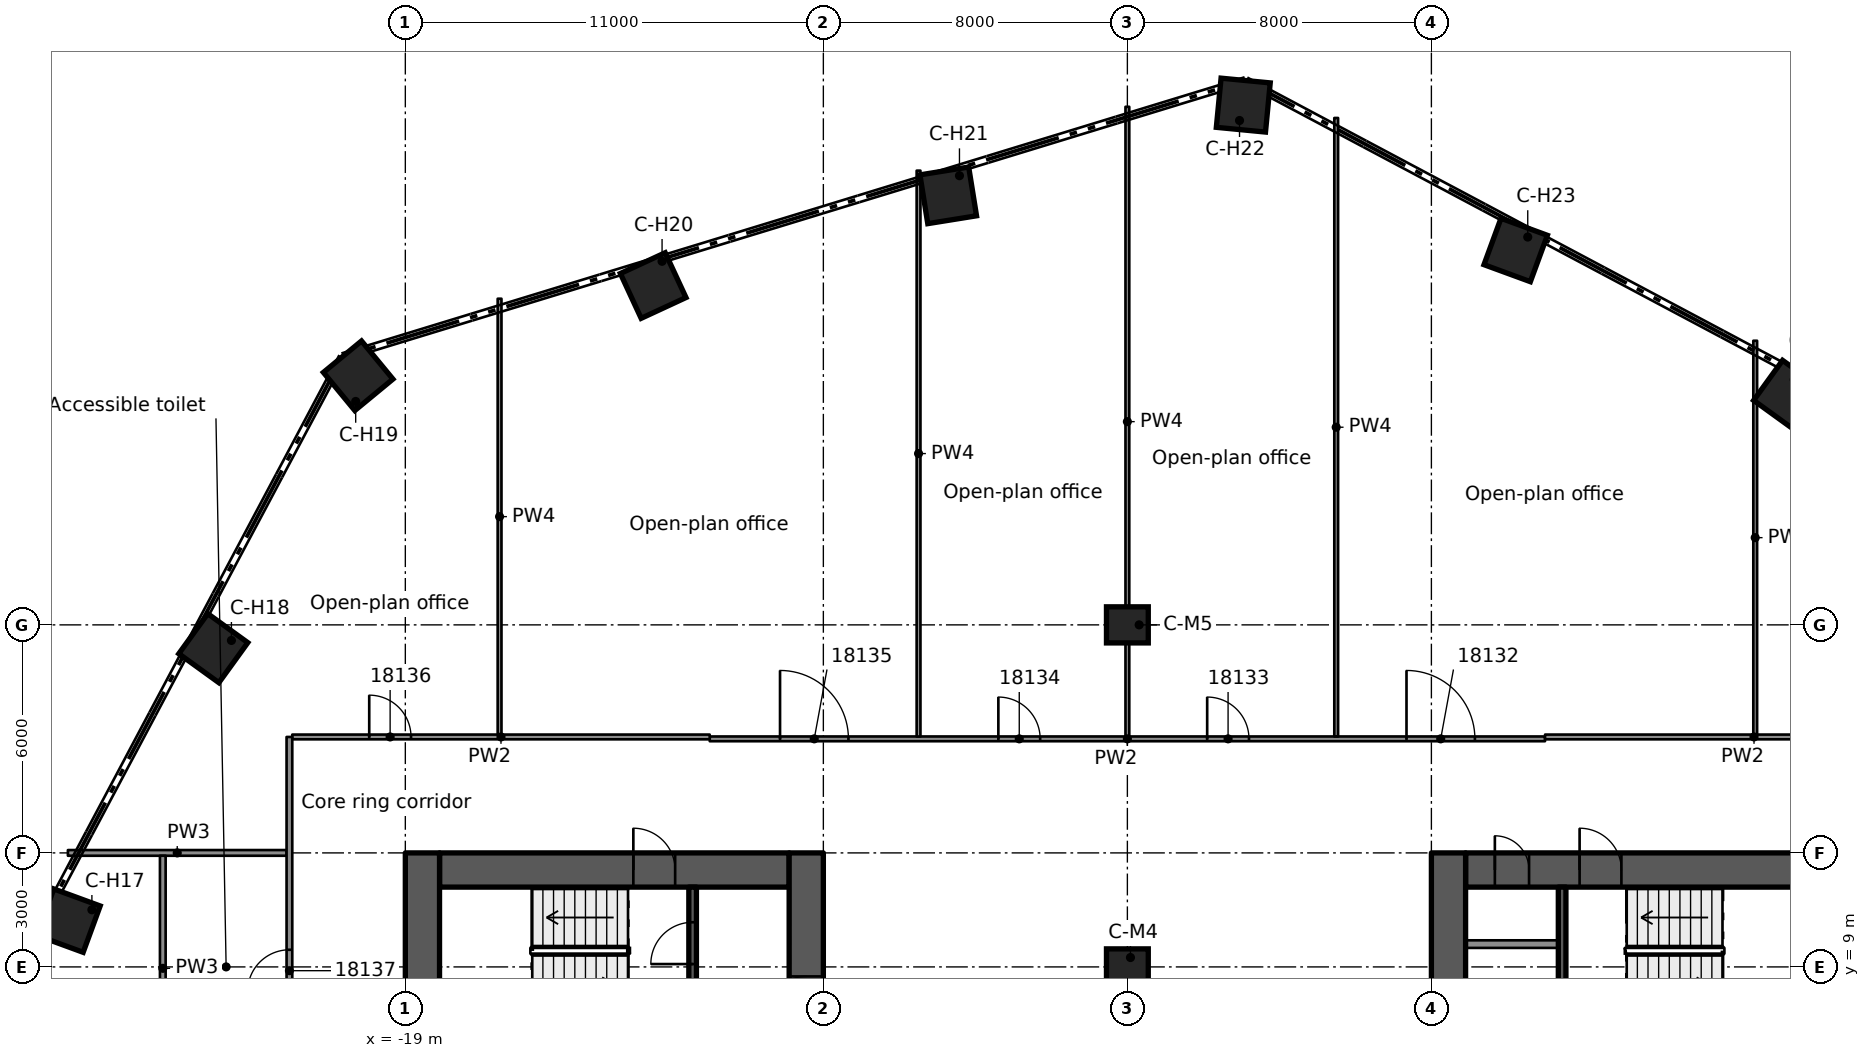
"""IFC4 building model, lengths in metres.
Left out: names, types, materials, properties, quantities, classifications, styles, units other than length and angle.
Written with IfcOpenShell. Run it as: python <this file> out.ifc"""

import sys

from ifc_helpers import new_model, si_unit, direction, frame, frame_2d, origin, origin_2d, place, context, subcontext, project, spatial, rectangle, extrude, element, fill, save


model = new_model("IFC4")
c1 = context("Model", 3, precision=1e-05, world=origin(), true_north=direction((0.0, 1.0)))
c2 = subcontext(c1, "Body", "Model", "MODEL_VIEW")
j1 = project(units=[si_unit("LENGTHUNIT", "METRE"), si_unit("PLANEANGLEUNIT", "RADIAN")], contexts=[c1])
p1 = place(None, origin())
s1 = spatial("IfcSite", under=j1, at=p1, CompositionType="ELEMENT")
p2 = place(p1, origin())
s2 = spatial("IfcBuilding", under=s1, at=p2, CompositionType="ELEMENT")
p3 = place(p2, frame((0.0, 0.0, 91.2)))
s3 = spatial("IfcBuildingStorey", under=s2, at=p3, CompositionType="ELEMENT", Elevation=91.2)
p4 = place(p3, frame((-18.1, 11.55, 0.0), z_axis=(0.0, 0.0, 1.0), x_axis=(1.0, 0.0, 0.0)))
e1 = element("IfcWall", 1, at=p4, inside=s3, PredefinedType="SHEAR", context=c2, shape_type="SweptSolid", body=[
    extrude(rectangle(XDim=9.2, YDim=0.9, at=frame_2d((4.6, 0.0))), origin(), (0.0, 0.0, 1.0), 3.5),
])
p5 = place(p4, frame((5.1, 0.0, 0.0)))
e2 = element("IfcOpeningElement", 2, at=p5, cuts=e1, PredefinedType="OPENING", context=c2, shape_type="SweptSolid", body=[
    extrude(rectangle(XDim=1.1, YDim=2.1, at=frame_2d((0.55, 1.05))), frame((0.0, 0.46, 0.0), z_axis=(0.0, -1.0, 0.0), x_axis=(1.0, 0.0, 0.0)), (0.0, 0.0, 1.0), 0.92),
])
p6 = place(p3, frame((-18.55, -12.0, 0.0), z_axis=(0.0, 0.0, 1.0), x_axis=(0.0, 1.0, 0.0)))
e3 = element("IfcWall", 3, at=p6, inside=s3, PredefinedType="SHEAR", context=c2, shape_type="SweptSolid", body=[
    extrude(rectangle(XDim=24.0, YDim=0.9, at=frame_2d((12.0, 0.0))), origin(), (0.0, 0.0, 1.0), 3.5),
])
p7 = place(p6, frame((10.1, 0.0, 0.0)))
e4 = element("IfcOpeningElement", 4, at=p7, cuts=e3, PredefinedType="OPENING", context=c2, shape_type="SweptSolid", body=[
    extrude(rectangle(XDim=1.8, YDim=2.1, at=frame_2d((0.9, 1.05))), frame((0.0, 0.46, 0.0), z_axis=(0.0, -1.0, 0.0), x_axis=(1.0, 0.0, 0.0)), (0.0, 0.0, 1.0), 0.92),
])
p8 = place(p3, frame((-8.45, -12.0, 0.0), z_axis=(0.0, 0.0, 1.0), x_axis=(0.0, 1.0, 0.0)))
e5 = element("IfcWall", 5, at=p8, inside=s3, PredefinedType="SHEAR", context=c2, shape_type="SweptSolid", body=[
    extrude(rectangle(XDim=24.0, YDim=0.9, at=frame_2d((12.0, 0.0))), origin(), (0.0, 0.0, 1.0), 3.5),
])
p9 = place(p8, frame((9.6, 0.0, 0.0)))
e6 = element("IfcOpeningElement", 6, at=p9, cuts=e5, PredefinedType="OPENING", context=c2, shape_type="SweptSolid", body=[
    extrude(rectangle(XDim=1.8, YDim=2.1, at=frame_2d((0.9, 1.05))), frame((0.0, 0.46, 0.0), z_axis=(0.0, -1.0, 0.0), x_axis=(1.0, 0.0, 0.0)), (0.0, 0.0, 1.0), 0.92),
])
p10 = place(p8, frame((19.65, 0.0, 0.0)))
e7 = element("IfcOpeningElement", 7, at=p10, cuts=e5, PredefinedType="OPENING", context=c2, shape_type="SweptSolid", body=[
    extrude(rectangle(XDim=1.1, YDim=2.1, at=frame_2d((0.55, 1.05))), frame((0.0, 0.46, 0.0), z_axis=(0.0, -1.0, 0.0), x_axis=(1.0, 0.0, 0.0)), (0.0, 0.0, 1.0), 0.92),
])
p11 = place(p3, frame((8.9, 11.55, 0.0), z_axis=(0.0, 0.0, 1.0), x_axis=(1.0, 0.0, 0.0)))
e8 = element("IfcWall", 8, at=p11, inside=s3, PredefinedType="SHEAR", context=c2, shape_type="SweptSolid", body=[
    extrude(rectangle(XDim=9.2, YDim=0.9, at=frame_2d((4.6, 0.0))), origin(), (0.0, 0.0, 1.0), 3.5),
])
p12 = place(p11, frame((3.0, 0.0, 0.0)))
e9 = element("IfcOpeningElement", 9, at=p12, cuts=e8, PredefinedType="OPENING", context=c2, shape_type="SweptSolid", body=[
    extrude(rectangle(XDim=1.1, YDim=2.1, at=frame_2d((0.55, 1.05))), frame((0.0, 0.46, 0.0), z_axis=(0.0, -1.0, 0.0), x_axis=(1.0, 0.0, 0.0)), (0.0, 0.0, 1.0), 0.92),
])
p13 = place(p11, frame((0.77, 0.0, 0.0)))
e10 = element("IfcOpeningElement", 10, at=p13, cuts=e8, PredefinedType="OPENING", context=c2, shape_type="SweptSolid", body=[
    extrude(rectangle(XDim=0.9, YDim=2.1, at=frame_2d((0.45, 1.05))), frame((0.0, 0.46, 0.0), z_axis=(0.0, -1.0, 0.0), x_axis=(1.0, 0.0, 0.0)), (0.0, 0.0, 1.0), 0.92),
])
p14 = place(p3, frame((8.45, -12.0, 0.0), z_axis=(0.0, 0.0, 1.0), x_axis=(0.0, 1.0, 0.0)))
e11 = element("IfcWall", 11, at=p14, inside=s3, PredefinedType="SHEAR", context=c2, shape_type="SweptSolid", body=[
    extrude(rectangle(XDim=24.0, YDim=0.9, at=frame_2d((12.0, 0.0))), origin(), (0.0, 0.0, 1.0), 3.5),
])
p15 = place(p14, frame((12.6, 0.0, 0.0)))
e12 = element("IfcOpeningElement", 12, at=p15, cuts=e11, PredefinedType="OPENING", context=c2, shape_type="SweptSolid", body=[
    extrude(rectangle(XDim=1.8, YDim=2.1, at=frame_2d((0.9, 1.05))), frame((0.0, 0.46, 0.0), z_axis=(0.0, -1.0, 0.0), x_axis=(1.0, 0.0, 0.0)), (0.0, 0.0, 1.0), 0.92),
])
p16 = place(p14, frame((3.25, 0.0, 0.0)))
e13 = element("IfcOpeningElement", 13, at=p16, cuts=e11, PredefinedType="OPENING", context=c2, shape_type="SweptSolid", body=[
    extrude(rectangle(XDim=1.1, YDim=2.1, at=frame_2d((0.55, 1.05))), frame((0.0, 0.46, 0.0), z_axis=(0.0, -1.0, 0.0), x_axis=(1.0, 0.0, 0.0)), (0.0, 0.0, 1.0), 0.92),
])
for number, where, z_axis, x_axis in (
    (14, (-27.864, 10.218, 0.0), (0.0, 0.0, 1.0), (-0.939, 0.344, 0.0)),
    (15, (-24.053, 17.387, 0.0), (0.0, 0.0, 1.0), (-0.81, 0.586, 0.0)),
    (16, (-20.241, 24.555, 0.0), (0.0, 0.0, 1.0), (-0.636, 0.772, 0.0)),
    (17, (-12.478, 26.929, 0.0), (0.0, 0.0, 1.0), (-0.42, 0.907, 0.0)),
    (18, (-4.714, 29.302, 0.0), (0.0, 0.0, 1.0), (-0.159, 0.987, 0.0)),
    (19, (3.05, 31.676, 0.0), (0.0, 0.0, 1.0), (0.096, 0.995, 0.0)),
    (20, (10.218, 27.864, 0.0), (0.0, 0.0, 1.0), (0.344, 0.939, 0.0)),
    (21, (17.387, 24.053, 0.0), (0.0, 0.0, 1.0), (0.586, 0.81, 0.0)),
):
    element("IfcColumn", number, at=place(p3, frame(where, z_axis=z_axis, x_axis=x_axis)), inside=s3, PredefinedType="COLUMN", context=c2, shape_type="SweptSolid", body=[
        extrude(rectangle(XDim=1.3, YDim=1.3, at=origin_2d()), origin(), (0.0, 0.0, 1.0), 3.5),
    ])
for number, where, z_axis, x_axis in (
    (22, (0.0, 9.0, 0.0), (0.0, 0.0, 1.0), (1.0, 0.0, 0.0)),
    (23, (0.0, 18.0, 0.0), (0.0, 0.0, 1.0), (1.0, 0.0, 0.0)),
):
    element("IfcColumn", number, at=place(p3, frame(where, z_axis=z_axis, x_axis=x_axis)), inside=s3, PredefinedType="COLUMN", context=c2, shape_type="SweptSolid", body=[
        extrude(rectangle(XDim=1.1, YDim=0.95, at=origin_2d()), origin(), (0.0, 0.0, 1.0), 3.5),
    ])
p17 = place(p3, frame((-11.44, 6.975, 0.0), z_axis=(0.0, 0.0, 1.0), x_axis=(0.0, 1.0, 0.0)))
e24 = element("IfcWall", 24, at=p17, inside=s3, PredefinedType="SOLIDWALL", context=c2, shape_type="SweptSolid", body=[
    extrude(rectangle(XDim=4.125, YDim=0.2, at=frame_2d((2.062, 0.0))), origin(), (0.0, 0.0, 1.0), 3.09),
])
p18 = place(p17, frame((2.1, 0.0, 0.0)))
e25 = element("IfcOpeningElement", 25, at=p18, cuts=e24, PredefinedType="OPENING", context=c2, shape_type="SweptSolid", body=[
    extrude(rectangle(XDim=1.1, YDim=2.1, at=frame_2d((0.55, 1.05))), frame((0.0, 0.11, 0.0), z_axis=(0.0, -1.0, 0.0), x_axis=(1.0, 0.0, 0.0)), (0.0, 0.0, 1.0), 0.22),
])
p19 = place(p3, frame((11.44, 11.1, 0.0), z_axis=(0.0, 0.0, 1.0), x_axis=(0.0, -1.0, 0.0)))
e26 = element("IfcWall", 26, at=p19, inside=s3, PredefinedType="SOLIDWALL", context=c2, shape_type="SweptSolid", body=[
    extrude(rectangle(XDim=4.125, YDim=0.2, at=frame_2d((2.062, 0.0))), origin(), (0.0, 0.0, 1.0), 3.09),
])
p20 = place(p3, frame((8.9, 9.6, 0.0), z_axis=(0.0, 0.0, 1.0), x_axis=(1.0, 0.0, 0.0)))
e27 = element("IfcWall", 27, at=p20, inside=s3, PredefinedType="PARTITIONING", context=c2, shape_type="SweptSolid", body=[
    extrude(rectangle(XDim=2.44, YDim=0.2, at=frame_2d((1.22, 0.0))), origin(), (0.0, 0.0, 1.0), 3.09),
])
p21 = place(p3, frame((-27.879, 12.0, 0.0), z_axis=(0.0, 0.0, 1.0), x_axis=(1.0, 0.0, 0.0)))
e28 = element("IfcWall", 28, at=p21, inside=s3, PredefinedType="PARTITIONING", context=c2, shape_type="SweptSolid", body=[
    extrude(rectangle(XDim=5.754, YDim=0.15, at=frame_2d((2.877, 0.0))), origin(), (0.0, 0.0, 1.0), 3.08),
])
p22 = place(p3, frame((-10.99, 15.001, 0.0), z_axis=(0.0, 0.0, 1.0), x_axis=(1.0, 0.0, 0.0)))
e29 = element("IfcWall", 29, at=p22, inside=s3, PredefinedType="PARTITIONING", context=c2, shape_type="SweptSolid", body=[
    extrude(rectangle(XDim=21.98, YDim=0.125, at=frame_2d((10.99, 0.0))), origin(), (0.0, 0.0, 1.0), 3.08),
])
p23 = place(p22, frame((18.335, 0.0, 0.0)))
e30 = element("IfcOpeningElement", 30, at=p23, cuts=e29, PredefinedType="OPENING", context=c2, shape_type="SweptSolid", body=[
    extrude(rectangle(XDim=1.8, YDim=2.1, at=frame_2d((0.9, 1.05))), frame((0.0, 0.073, 0.0), z_axis=(0.0, -1.0, 0.0), x_axis=(1.0, 0.0, 0.0)), (0.0, 0.0, 1.0), 0.145),
])
p24 = place(p22, frame((13.09, 0.0, 0.0)))
e31 = element("IfcOpeningElement", 31, at=p24, cuts=e29, PredefinedType="OPENING", context=c2, shape_type="SweptSolid", body=[
    extrude(rectangle(XDim=1.1, YDim=2.1, at=frame_2d((0.55, 1.05))), frame((0.0, 0.073, 0.0), z_axis=(0.0, -1.0, 0.0), x_axis=(1.0, 0.0, 0.0)), (0.0, 0.0, 1.0), 0.145),
])
p25 = place(p22, frame((7.595, 0.0, 0.0)))
e32 = element("IfcOpeningElement", 32, at=p25, cuts=e29, PredefinedType="OPENING", context=c2, shape_type="SweptSolid", body=[
    extrude(rectangle(XDim=1.1, YDim=2.1, at=frame_2d((0.55, 1.05))), frame((0.0, 0.073, 0.0), z_axis=(0.0, -1.0, 0.0), x_axis=(1.0, 0.0, 0.0)), (0.0, 0.0, 1.0), 0.145),
])
p26 = place(p22, frame((1.85, 0.0, 0.0)))
e33 = element("IfcOpeningElement", 33, at=p26, cuts=e29, PredefinedType="OPENING", context=c2, shape_type="SweptSolid", body=[
    extrude(rectangle(XDim=1.8, YDim=2.1, at=frame_2d((0.9, 1.05))), frame((0.0, 0.073, 0.0), z_axis=(0.0, -1.0, 0.0), x_axis=(1.0, 0.0, 0.0)), (0.0, 0.0, 1.0), 0.145),
])
p27 = place(p3, frame((-21.975, 15.051, 0.0), z_axis=(0.0, 0.0, 1.0), x_axis=(1.0, 0.0, 0.0)))
e34 = element("IfcWall", 34, at=p27, inside=s3, PredefinedType="PARTITIONING", context=c2, shape_type="SweptSolid", body=[
    extrude(rectangle(XDim=10.984, YDim=0.125, at=frame_2d((5.492, 0.0))), origin(), (0.0, 0.0, 1.0), 3.08),
])
p28 = place(p27, frame((2.025, 0.0, 0.0)))
e35 = element("IfcOpeningElement", 35, at=p28, cuts=e34, PredefinedType="OPENING", context=c2, shape_type="SweptSolid", body=[
    extrude(rectangle(XDim=1.1, YDim=2.1, at=frame_2d((0.55, 1.05))), frame((0.0, 0.073, 0.0), z_axis=(0.0, -1.0, 0.0), x_axis=(1.0, 0.0, 0.0)), (0.0, 0.0, 1.0), 0.145),
])
p29 = place(p3, frame((10.991, 15.051, 0.0), z_axis=(0.0, 0.0, 1.0), x_axis=(1.0, 0.0, 0.0)))
e36 = element("IfcWall", 36, at=p29, inside=s3, PredefinedType="PARTITIONING", context=c2, shape_type="SweptSolid", body=[
    extrude(rectangle(XDim=10.997, YDim=0.125, at=frame_2d((5.499, 0.0))), origin(), (0.0, 0.0, 1.0), 3.08),
])
p30 = place(p29, frame((7.63, 0.0, 0.0)))
e37 = element("IfcOpeningElement", 37, at=p30, cuts=e36, PredefinedType="OPENING", context=c2, shape_type="SweptSolid", body=[
    extrude(rectangle(XDim=1.1, YDim=2.1, at=frame_2d((0.55, 1.05))), frame((0.0, 0.073, 0.0), z_axis=(0.0, -1.0, 0.0), x_axis=(1.0, 0.0, 0.0)), (0.0, 0.0, 1.0), 0.145),
])
p31 = place(p3, frame((16.521, 15.114, 0.0), z_axis=(0.0, 0.0, 1.0), x_axis=(0.0, 1.0, 0.0)))
e38 = element("IfcWall", 38, at=p31, inside=s3, PredefinedType="PARTITIONING", context=c2, shape_type="SweptSolid", body=[
    extrude(rectangle(XDim=10.362, YDim=0.1, at=frame_2d((5.181, 0.0))), origin(), (0.0, 0.0, 1.0), 2.445),
])
p32 = place(p3, frame((5.495, 15.063, 0.0), z_axis=(0.0, 0.0, 1.0), x_axis=(0.0, 1.0, 0.0)))
e39 = element("IfcWall", 39, at=p32, inside=s3, PredefinedType="PARTITIONING", context=c2, shape_type="SweptSolid", body=[
    extrude(rectangle(XDim=16.275, YDim=0.1, at=frame_2d((8.137, 0.0))), origin(), (0.0, 0.0, 1.0), 2.445),
])
p33 = place(p3, frame((0.0, 15.063, 0.0), z_axis=(0.0, 0.0, 1.0), x_axis=(0.0, 1.0, 0.0)))
e40 = element("IfcWall", 40, at=p33, inside=s3, PredefinedType="PARTITIONING", context=c2, shape_type="SweptSolid", body=[
    extrude(rectangle(XDim=16.569, YDim=0.1, at=frame_2d((8.285, 0.0))), origin(), (0.0, 0.0, 1.0), 2.445),
])
p34 = place(p3, frame((-5.495, 15.063, 0.0), z_axis=(0.0, 0.0, 1.0), x_axis=(0.0, 1.0, 0.0)))
e41 = element("IfcWall", 41, at=p34, inside=s3, PredefinedType="PARTITIONING", context=c2, shape_type="SweptSolid", body=[
    extrude(rectangle(XDim=14.889, YDim=0.1, at=frame_2d((7.444, 0.0))), origin(), (0.0, 0.0, 1.0), 2.445),
])
p35 = place(p3, frame((-16.52, 15.114, 0.0), z_axis=(0.0, 0.0, 1.0), x_axis=(0.0, 1.0, 0.0)))
e42 = element("IfcWall", 42, at=p35, inside=s3, PredefinedType="PARTITIONING", context=c2, shape_type="SweptSolid", body=[
    extrude(rectangle(XDim=11.468, YDim=0.1, at=frame_2d((5.734, 0.0))), origin(), (0.0, 0.0, 1.0), 2.445),
])
p36 = place(p3, frame((-22.05, -15.051, 0.0), z_axis=(0.0, 0.0, 1.0), x_axis=(0.0, 1.0, 0.0)))
e43 = element("IfcWall", 43, at=p36, inside=s3, PredefinedType="PARTITIONING", context=c2, shape_type="SweptSolid", body=[
    extrude(rectangle(XDim=30.102, YDim=0.15, at=frame_2d((15.051, 0.0))), origin(), (0.0, 0.0, 1.0), 3.08),
])
p37 = place(p36, frame((11.651, 0.0, 0.0)))
e44 = element("IfcOpeningElement", 44, at=p37, cuts=e43, PredefinedType="OPENING", context=c2, shape_type="SweptSolid", body=[
    extrude(rectangle(XDim=0.9, YDim=2.1, at=frame_2d((0.45, 1.05))), frame((0.0, 0.085, 0.0), z_axis=(0.0, -1.0, 0.0), x_axis=(1.0, 0.0, 0.0)), (0.0, 0.0, 1.0), 0.17),
])
p38 = place(p36, frame((1.1, 0.0, 0.0)))
e45 = element("IfcOpeningElement", 45, at=p38, cuts=e43, PredefinedType="OPENING", context=c2, shape_type="SweptSolid", body=[
    extrude(rectangle(XDim=0.9, YDim=2.1, at=frame_2d((0.45, 1.05))), frame((0.0, 0.085, 0.0), z_axis=(0.0, -1.0, 0.0), x_axis=(1.0, 0.0, 0.0)), (0.0, 0.0, 1.0), 0.17),
])
p39 = place(p36, frame((23.402, 0.0, 0.0)))
e46 = element("IfcOpeningElement", 46, at=p39, cuts=e43, PredefinedType="OPENING", context=c2, shape_type="SweptSolid", body=[
    extrude(rectangle(XDim=1.1, YDim=2.1, at=frame_2d((0.55, 1.05))), frame((0.0, 0.085, 0.0), z_axis=(0.0, -1.0, 0.0), x_axis=(1.0, 0.0, 0.0)), (0.0, 0.0, 1.0), 0.17),
])
p40 = place(p3, frame((-25.382, 6.001, 0.0), z_axis=(0.0, 0.0, 1.0), x_axis=(0.0, 1.0, 0.0)))
e47 = element("IfcWall", 47, at=p40, inside=s3, PredefinedType="PARTITIONING", context=c2, shape_type="SweptSolid", body=[
    extrude(rectangle(XDim=5.924, YDim=0.15, at=frame_2d((2.962, 0.0))), origin(), (0.0, 0.0, 1.0), 3.08),
])
p41 = place(p10, origin())
e48 = element("IfcDoor", 48, at=p41, inside=s3, OperationType="SINGLE_SWING_RIGHT", PredefinedType="DOOR", context=c2, shape_type="SweptSolid", body=[
    extrude(rectangle(XDim=1.1, YDim=2.1, at=frame_2d((0.55, 1.05))), frame((0.0, 0.025, 0.0), z_axis=(0.0, -1.0, 0.0), x_axis=(1.0, 0.0, 0.0)), (0.0, 0.0, 1.0), 0.05),
])
fill(e7, e48)
p42 = place(p5, origin())
e49 = element("IfcDoor", 49, at=p42, inside=s3, OperationType="SINGLE_SWING_RIGHT", PredefinedType="DOOR", context=c2, shape_type="SweptSolid", body=[
    extrude(rectangle(XDim=1.1, YDim=2.1, at=frame_2d((0.55, 1.05))), frame((0.0, 0.025, 0.0), z_axis=(0.0, -1.0, 0.0), x_axis=(1.0, 0.0, 0.0)), (0.0, 0.0, 1.0), 0.05),
])
fill(e2, e49)
p43 = place(p18, origin())
e50 = element("IfcDoor", 50, at=p43, inside=s3, OperationType="SINGLE_SWING_RIGHT", PredefinedType="DOOR", context=c2, shape_type="SweptSolid", body=[
    extrude(rectangle(XDim=1.1, YDim=2.1, at=frame_2d((0.55, 1.05))), frame((0.0, 0.025, 0.0), z_axis=(0.0, -1.0, 0.0), x_axis=(1.0, 0.0, 0.0)), (0.0, 0.0, 1.0), 0.05),
])
fill(e25, e50)
p44 = place(p12, origin())
e51 = element("IfcDoor", 51, at=p44, inside=s3, OperationType="SINGLE_SWING_LEFT", PredefinedType="DOOR", context=c2, shape_type="SweptSolid", body=[
    extrude(rectangle(XDim=1.1, YDim=2.1, at=frame_2d((0.55, 1.05))), frame((0.0, 0.025, 0.0), z_axis=(0.0, -1.0, 0.0), x_axis=(1.0, 0.0, 0.0)), (0.0, 0.0, 1.0), 0.05),
])
fill(e9, e51)
p45 = place(p13, origin())
e52 = element("IfcDoor", 52, at=p45, inside=s3, OperationType="SINGLE_SWING_LEFT", PredefinedType="DOOR", context=c2, shape_type="SweptSolid", body=[
    extrude(rectangle(XDim=0.9, YDim=2.1, at=frame_2d((0.45, 1.05))), frame((0.0, 0.025, 0.0), z_axis=(0.0, -1.0, 0.0), x_axis=(1.0, 0.0, 0.0)), (0.0, 0.0, 1.0), 0.05),
])
fill(e10, e52)
p46 = place(p23, origin())
e53 = element("IfcDoor", 53, at=p46, inside=s3, OperationType="DOUBLE_DOOR_SINGLE_SWING", PredefinedType="DOOR", context=c2, shape_type="SweptSolid", body=[
    extrude(rectangle(XDim=1.8, YDim=2.1, at=frame_2d((0.9, 1.05))), frame((0.0, 0.025, 0.0), z_axis=(0.0, -1.0, 0.0), x_axis=(1.0, 0.0, 0.0)), (0.0, 0.0, 1.0), 0.05),
])
fill(e30, e53)
p47 = place(p24, origin())
e54 = element("IfcDoor", 54, at=p47, inside=s3, OperationType="SINGLE_SWING_RIGHT", PredefinedType="DOOR", context=c2, shape_type="SweptSolid", body=[
    extrude(rectangle(XDim=1.1, YDim=2.1, at=frame_2d((0.55, 1.05))), frame((0.0, 0.025, 0.0), z_axis=(0.0, -1.0, 0.0), x_axis=(1.0, 0.0, 0.0)), (0.0, 0.0, 1.0), 0.05),
])
fill(e31, e54)
p48 = place(p25, origin())
e55 = element("IfcDoor", 55, at=p48, inside=s3, OperationType="SINGLE_SWING_LEFT", PredefinedType="DOOR", context=c2, shape_type="SweptSolid", body=[
    extrude(rectangle(XDim=1.1, YDim=2.1, at=frame_2d((0.55, 1.05))), frame((0.0, 0.025, 0.0), z_axis=(0.0, -1.0, 0.0), x_axis=(1.0, 0.0, 0.0)), (0.0, 0.0, 1.0), 0.05),
])
fill(e32, e55)
p49 = place(p26, origin())
e56 = element("IfcDoor", 56, at=p49, inside=s3, OperationType="DOUBLE_DOOR_SINGLE_SWING", PredefinedType="DOOR", context=c2, shape_type="SweptSolid", body=[
    extrude(rectangle(XDim=1.8, YDim=2.1, at=frame_2d((0.9, 1.05))), frame((0.0, 0.025, 0.0), z_axis=(0.0, -1.0, 0.0), x_axis=(1.0, 0.0, 0.0)), (0.0, 0.0, 1.0), 0.05),
])
fill(e33, e56)
p50 = place(p28, origin())
e57 = element("IfcDoor", 57, at=p50, inside=s3, OperationType="SINGLE_SWING_LEFT", PredefinedType="DOOR", context=c2, shape_type="SweptSolid", body=[
    extrude(rectangle(XDim=1.1, YDim=2.1, at=frame_2d((0.55, 1.05))), frame((0.0, 0.025, 0.0), z_axis=(0.0, -1.0, 0.0), x_axis=(1.0, 0.0, 0.0)), (0.0, 0.0, 1.0), 0.05),
])
fill(e35, e57)
p51 = place(p39, origin())
e58 = element("IfcDoor", 58, at=p51, inside=s3, OperationType="SINGLE_SWING_RIGHT", PredefinedType="DOOR", context=c2, shape_type="SweptSolid", body=[
    extrude(rectangle(XDim=1.1, YDim=2.1, at=frame_2d((0.55, 1.05))), frame((0.0, 0.025, 0.0), z_axis=(0.0, -1.0, 0.0), x_axis=(1.0, 0.0, 0.0)), (0.0, 0.0, 1.0), 0.05),
])
fill(e46, e58)
save(model, sys.argv[1])
